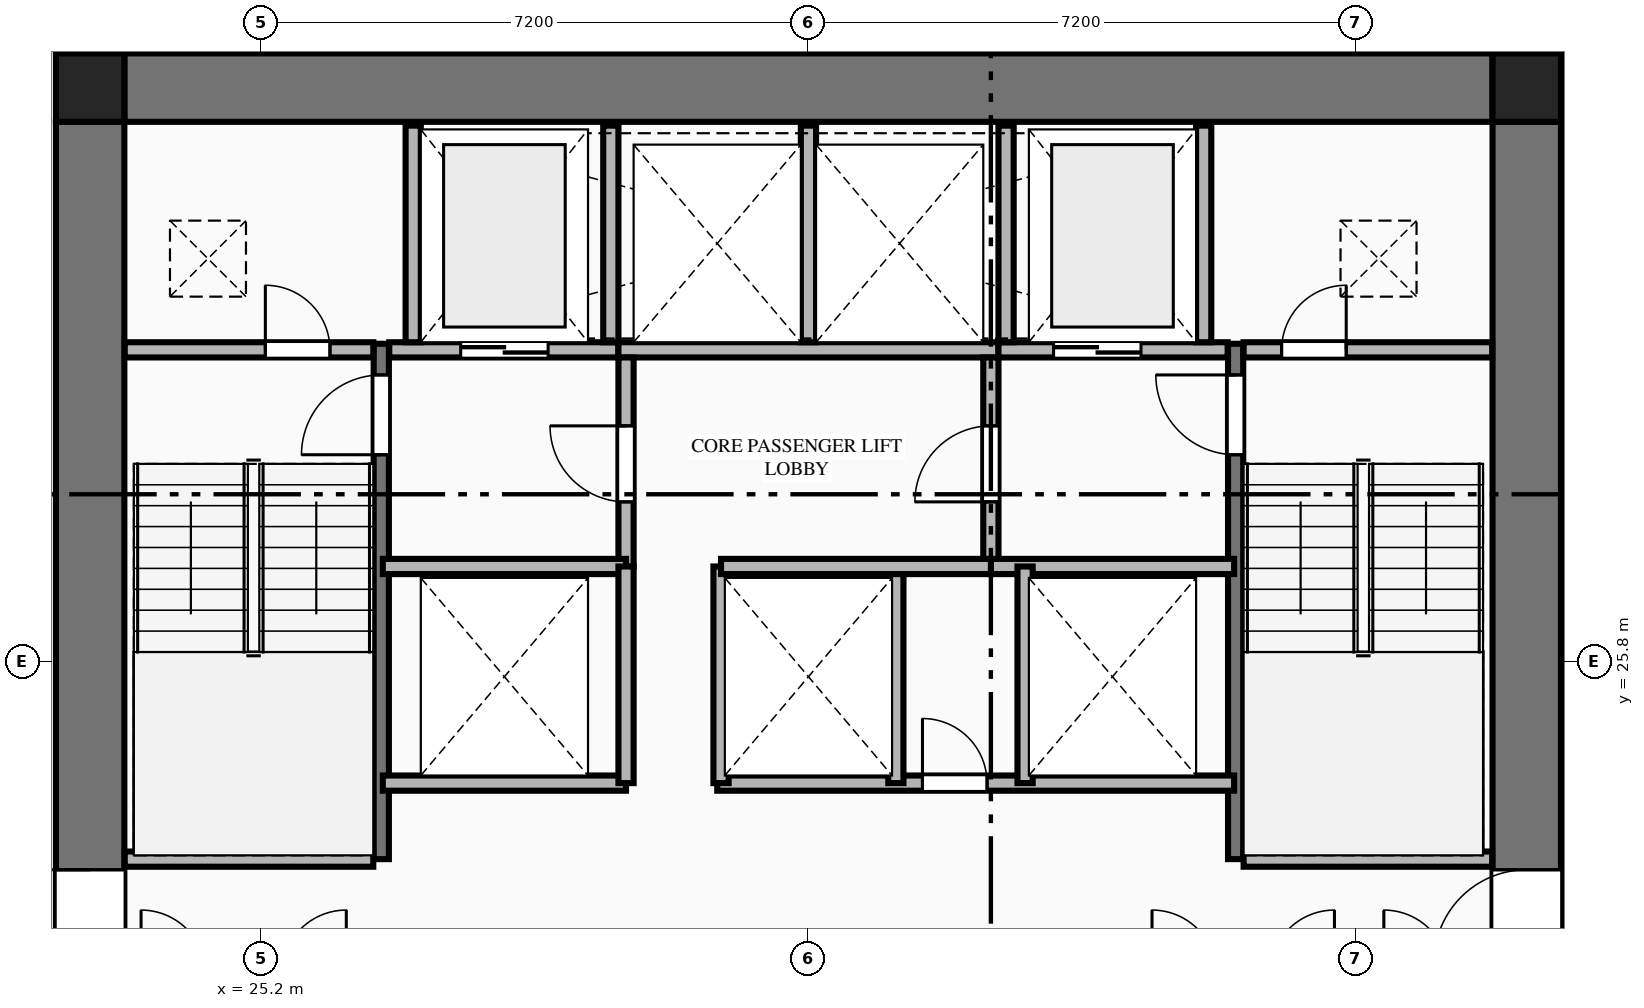
"""IFC4 building model, lengths in metres.
Left out: names, types, materials, properties, quantities, classifications, styles, units other than length and angle.
Written with IfcOpenShell. Run it as: python <this file> out.ifc"""

import sys

from ifc_helpers import new_model, si_unit, direction, frame, frame_2d, origin, origin_2d, place, context, subcontext, project, spatial, rectangle, extrude, element, fill, save


model = new_model("IFC4")
c1 = context("Model", 3, precision=1e-05, world=origin(), true_north=direction((0.0, 1.0)))
c2 = subcontext(c1, "Body", "Model", "MODEL_VIEW")
j1 = project(units=[si_unit("LENGTHUNIT", "METRE"), si_unit("PLANEANGLEUNIT", "RADIAN")], contexts=[c1])
p1 = place(None, origin())
s1 = spatial("IfcSite", under=j1, at=p1, CompositionType="ELEMENT")
p2 = place(p1, origin())
s2 = spatial("IfcBuilding", under=s1, at=p2, CompositionType="ELEMENT")
p3 = place(p2, frame((0.0, 0.0, 46.2)))
s3 = spatial("IfcBuildingStorey", under=s2, at=p3, CompositionType="ELEMENT", Elevation=46.2)
for number, where, z_axis, x_axis in (
    (1, (41.85, 33.35, 0.0), (0.0, 0.0, 1.0), (1.0, 0.0, 0.0)),
    (2, (22.95, 33.35, 0.0), (0.0, 0.0, 1.0), (1.0, 0.0, 0.0)),
):
    element("IfcColumn", number, at=place(p3, frame(where, z_axis=z_axis, x_axis=x_axis)), inside=s3, PredefinedType="COLUMN", context=c2, shape_type="SweptSolid", body=[
        extrude(rectangle(XDim=0.9, YDim=0.9, at=origin_2d()), origin(), (0.0, 0.0, 1.0), 3.55),
    ])
p4 = place(p3, frame((23.4, 33.35, 0.0), z_axis=(0.0, 0.0, 1.0), x_axis=(1.0, 0.0, 0.0)))
e3 = element("IfcWall", 3, at=p4, inside=s3, PredefinedType="SHEAR", context=c2, shape_type="SweptSolid", body=[
    extrude(rectangle(XDim=18.0, YDim=0.9, at=frame_2d((9.0, 0.0))), origin(), (0.0, 0.0, 1.0), 3.33),
])
p5 = place(p3, frame((22.95, 18.9, 0.0), z_axis=(0.0, 0.0, 1.0), x_axis=(0.0, 1.0, 0.0)))
e4 = element("IfcWall", 4, at=p5, inside=s3, PredefinedType="SHEAR", context=c2, shape_type="SweptSolid", body=[
    extrude(rectangle(XDim=14.0, YDim=0.9, at=frame_2d((7.0, 0.0))), origin(), (0.0, 0.0, 1.0), 3.33),
])
p6 = place(p5, frame((2.94, 0.0, 0.0)))
e5 = element("IfcOpeningElement", 5, at=p6, cuts=e4, PredefinedType="OPENING", context=c2, shape_type="SweptSolid", body=[
    extrude(rectangle(XDim=1.22, YDim=2.25, at=frame_2d((0.61, 1.125))), frame((0.0, 0.46, 0.0), z_axis=(0.0, -1.0, 0.0), x_axis=(1.0, 0.0, 0.0)), (0.0, 0.0, 1.0), 0.92),
])
p7 = place(p3, frame((41.85, 18.9, 0.0), z_axis=(0.0, 0.0, 1.0), x_axis=(0.0, 1.0, 0.0)))
e6 = element("IfcWall", 6, at=p7, inside=s3, PredefinedType="SHEAR", context=c2, shape_type="SweptSolid", body=[
    extrude(rectangle(XDim=14.0, YDim=0.9, at=frame_2d((7.0, 0.0))), origin(), (0.0, 0.0, 1.0), 3.33),
])
p8 = place(p7, frame((2.94, 0.0, 0.0)))
e7 = element("IfcOpeningElement", 7, at=p8, cuts=e6, PredefinedType="OPENING", context=c2, shape_type="SweptSolid", body=[
    extrude(rectangle(XDim=1.22, YDim=2.25, at=frame_2d((0.61, 1.125))), frame((0.0, 0.46, 0.0), z_axis=(0.0, -1.0, 0.0), x_axis=(1.0, 0.0, 0.0)), (0.0, 0.0, 1.0), 0.92),
])
p9 = place(p3, frame((26.78, 23.2, 0.0), z_axis=(0.0, 0.0, 1.0), x_axis=(0.0, 1.0, 0.0)))
e8 = element("IfcWall", 8, at=p9, inside=s3, PredefinedType="SHEAR", context=c2, shape_type="SweptSolid", body=[
    extrude(rectangle(XDim=6.78, YDim=0.2, at=frame_2d((3.39, 0.0))), origin(), (0.0, 0.0, 1.0), 3.55),
])
p10 = place(p9, frame((5.32, 0.0, 0.0)))
e9 = element("IfcOpeningElement", 9, at=p10, cuts=e8, PredefinedType="OPENING", context=c2, shape_type="SweptSolid", body=[
    extrude(rectangle(XDim=1.05, YDim=2.15, at=frame_2d((0.525, 1.075))), frame((0.0, 0.11, 0.0), z_axis=(0.0, -1.0, 0.0), x_axis=(1.0, 0.0, 0.0)), (0.0, 0.0, 1.0), 0.22),
])
p11 = place(p3, frame((23.405, 23.2, 0.0), z_axis=(0.0, 0.0, 1.0), x_axis=(1.0, 0.0, 0.0)))
e10 = element("IfcWall", 10, at=p11, inside=s3, PredefinedType="PLUMBINGWALL", context=c2, shape_type="SweptSolid", body=[
    extrude(rectangle(XDim=3.27, YDim=0.2, at=frame_2d((1.635, 0.0))), origin(), (0.0, 0.0, 1.0), 3.33),
])
p12 = place(p3, frame((38.02, 23.2, 0.0), z_axis=(0.0, 0.0, 1.0), x_axis=(0.0, 1.0, 0.0)))
e11 = element("IfcWall", 11, at=p12, inside=s3, PredefinedType="SHEAR", context=c2, shape_type="SweptSolid", body=[
    extrude(rectangle(XDim=6.78, YDim=0.2, at=frame_2d((3.39, 0.0))), origin(), (0.0, 0.0, 1.0), 3.55),
])
p13 = place(p12, frame((5.32, 0.0, 0.0)))
e12 = element("IfcOpeningElement", 12, at=p13, cuts=e11, PredefinedType="OPENING", context=c2, shape_type="SweptSolid", body=[
    extrude(rectangle(XDim=1.05, YDim=2.15, at=frame_2d((0.525, 1.075))), frame((0.0, 0.11, 0.0), z_axis=(0.0, -1.0, 0.0), x_axis=(1.0, 0.0, 0.0)), (0.0, 0.0, 1.0), 0.22),
])
p14 = place(p3, frame((38.125, 23.2, 0.0), z_axis=(0.0, 0.0, 1.0), x_axis=(1.0, 0.0, 0.0)))
e13 = element("IfcWall", 13, at=p14, inside=s3, PredefinedType="PLUMBINGWALL", context=c2, shape_type="SweptSolid", body=[
    extrude(rectangle(XDim=3.27, YDim=0.2, at=frame_2d((1.635, 0.0))), origin(), (0.0, 0.0, 1.0), 3.33),
])
p15 = place(p3, frame((23.405, 29.9, 0.0), z_axis=(0.0, 0.0, 1.0), x_axis=(1.0, 0.0, 0.0)))
e14 = element("IfcWall", 14, at=p15, inside=s3, PredefinedType="PLUMBINGWALL", context=c2, shape_type="SweptSolid", body=[
    extrude(rectangle(XDim=3.27, YDim=0.2, at=frame_2d((1.635, 0.0))), origin(), (0.0, 0.0, 1.0), 3.33),
])
p16 = place(p15, frame((1.85, 0.0, 0.0)))
e15 = element("IfcOpeningElement", 15, at=p16, cuts=e14, PredefinedType="OPENING", context=c2, shape_type="SweptSolid", body=[
    extrude(rectangle(XDim=0.85, YDim=2.05, at=frame_2d((0.425, 1.025))), frame((0.0, 0.11, 0.0), z_axis=(0.0, -1.0, 0.0), x_axis=(1.0, 0.0, 0.0)), (0.0, 0.0, 1.0), 0.22),
])
p17 = place(p3, frame((26.885, 29.9, 0.0), z_axis=(0.0, 0.0, 1.0), x_axis=(1.0, 0.0, 0.0)))
e16 = element("IfcWall", 16, at=p17, inside=s3, PredefinedType="PLUMBINGWALL", context=c2, shape_type="SweptSolid", body=[
    extrude(rectangle(XDim=3.015, YDim=0.2, at=frame_2d((1.507, 0.0))), origin(), (0.0, 0.0, 1.0), 3.33),
])
p18 = place(p17, frame((0.94, 0.0, 0.0)))
e17 = element("IfcOpeningElement", 17, at=p18, cuts=e16, PredefinedType="OPENING", context=c2, shape_type="SweptSolid", body=[
    extrude(rectangle(XDim=1.15, YDim=2.2, at=frame_2d((0.575, 1.1))), frame((0.0, 0.11, 0.0), z_axis=(0.0, -1.0, 0.0), x_axis=(1.0, 0.0, 0.0)), (0.0, 0.0, 1.0), 0.22),
])
p19 = place(p3, frame((29.9, 29.9, 0.0), z_axis=(0.0, 0.0, 1.0), x_axis=(1.0, 0.0, 0.0)))
e18 = element("IfcWall", 18, at=p19, inside=s3, PredefinedType="PLUMBINGWALL", context=c2, shape_type="SweptSolid", body=[
    extrude(rectangle(XDim=5.0, YDim=0.2, at=frame_2d((2.5, 0.0))), origin(), (0.0, 0.0, 1.0), 3.33),
])
p20 = place(p3, frame((34.9, 29.9, 0.0), z_axis=(0.0, 0.0, 1.0), x_axis=(1.0, 0.0, 0.0)))
e19 = element("IfcWall", 19, at=p20, inside=s3, PredefinedType="PLUMBINGWALL", context=c2, shape_type="SweptSolid", body=[
    extrude(rectangle(XDim=3.015, YDim=0.2, at=frame_2d((1.508, 0.0))), origin(), (0.0, 0.0, 1.0), 3.33),
])
p21 = place(p20, frame((0.725, 0.0, 0.0)))
e20 = element("IfcOpeningElement", 20, at=p21, cuts=e19, PredefinedType="OPENING", context=c2, shape_type="SweptSolid", body=[
    extrude(rectangle(XDim=1.15, YDim=2.2, at=frame_2d((0.575, 1.1))), frame((0.0, 0.11, 0.0), z_axis=(0.0, -1.0, 0.0), x_axis=(1.0, 0.0, 0.0)), (0.0, 0.0, 1.0), 0.22),
])
p22 = place(p3, frame((38.125, 29.9, 0.0), z_axis=(0.0, 0.0, 1.0), x_axis=(1.0, 0.0, 0.0)))
e21 = element("IfcWall", 21, at=p22, inside=s3, PredefinedType="PLUMBINGWALL", context=c2, shape_type="SweptSolid", body=[
    extrude(rectangle(XDim=3.27, YDim=0.2, at=frame_2d((1.635, 0.0))), origin(), (0.0, 0.0, 1.0), 3.33),
])
p23 = place(p22, frame((0.5, 0.0, 0.0)))
e22 = element("IfcOpeningElement", 22, at=p23, cuts=e21, PredefinedType="OPENING", context=c2, shape_type="SweptSolid", body=[
    extrude(rectangle(XDim=0.85, YDim=2.05, at=frame_2d((0.425, 1.025))), frame((0.0, 0.11, 0.0), z_axis=(0.0, -1.0, 0.0), x_axis=(1.0, 0.0, 0.0)), (0.0, 0.0, 1.0), 0.22),
])
for number, where, z_axis, x_axis in (
    (23, (27.2, 30.0, 0.0), (0.0, 0.0, 1.0), (0.0, 1.0, 0.0)),
    (24, (29.8, 30.0, 0.0), (0.0, 0.0, 1.0), (0.0, 1.0, 0.0)),
    (25, (32.4, 30.0, 0.0), (0.0, 0.0, 1.0), (0.0, 1.0, 0.0)),
    (26, (35.0, 30.0, 0.0), (0.0, 0.0, 1.0), (0.0, 1.0, 0.0)),
    (27, (37.6, 30.0, 0.0), (0.0, 0.0, 1.0), (0.0, 1.0, 0.0)),
):
    element("IfcWall", number, at=place(p3, frame(where, z_axis=z_axis, x_axis=x_axis)), inside=s3, PredefinedType="PLUMBINGWALL", context=c2, shape_type="SweptSolid", body=[
        extrude(rectangle(XDim=2.85, YDim=0.2, at=frame_2d((1.425, 0.0))), origin(), (0.0, 0.0, 1.0), 3.33),
    ])
p24 = place(p3, frame((30.0, 27.05, 0.0), z_axis=(0.0, 0.0, 1.0), x_axis=(0.0, 1.0, 0.0)))
e28 = element("IfcWall", 28, at=p24, inside=s3, PredefinedType="PLUMBINGWALL", context=c2, shape_type="SweptSolid", body=[
    extrude(rectangle(XDim=2.75, YDim=0.2, at=frame_2d((1.375, 0.0))), origin(), (0.0, 0.0, 1.0), 3.33),
])
p25 = place(p24, frame((0.85, 0.0, 0.0)))
e29 = element("IfcOpeningElement", 29, at=p25, cuts=e28, PredefinedType="OPENING", context=c2, shape_type="SweptSolid", body=[
    extrude(rectangle(XDim=1.0, YDim=2.15, at=frame_2d((0.5, 1.075))), frame((0.0, 0.11, 0.0), z_axis=(0.0, -1.0, 0.0), x_axis=(1.0, 0.0, 0.0)), (0.0, 0.0, 1.0), 0.22),
])
p26 = place(p3, frame((26.8, 27.05, 0.0), z_axis=(0.0, 0.0, 1.0), x_axis=(1.0, 0.0, 0.0)))
e30 = element("IfcWall", 30, at=p26, inside=s3, PredefinedType="PLUMBINGWALL", context=c2, shape_type="SweptSolid", body=[
    extrude(rectangle(XDim=3.2, YDim=0.2, at=frame_2d((1.6, 0.0))), origin(), (0.0, 0.0, 1.0), 3.33),
])
p27 = place(p3, frame((34.8, 27.05, 0.0), z_axis=(0.0, 0.0, 1.0), x_axis=(0.0, 1.0, 0.0)))
e31 = element("IfcWall", 31, at=p27, inside=s3, PredefinedType="PLUMBINGWALL", context=c2, shape_type="SweptSolid", body=[
    extrude(rectangle(XDim=2.75, YDim=0.2, at=frame_2d((1.375, 0.0))), origin(), (0.0, 0.0, 1.0), 3.33),
])
p28 = place(p27, frame((0.85, 0.0, 0.0)))
e32 = element("IfcOpeningElement", 32, at=p28, cuts=e31, PredefinedType="OPENING", context=c2, shape_type="SweptSolid", body=[
    extrude(rectangle(XDim=1.0, YDim=2.15, at=frame_2d((0.5, 1.075))), frame((0.0, 0.11, 0.0), z_axis=(0.0, -1.0, 0.0), x_axis=(1.0, 0.0, 0.0)), (0.0, 0.0, 1.0), 0.22),
])
for number, where, z_axis, x_axis in (
    (33, (34.8, 27.05, 0.0), (0.0, 0.0, 1.0), (1.0, 0.0, 0.0)),
    (34, (26.8, 24.2, 0.0), (0.0, 0.0, 1.0), (1.0, 0.0, 0.0)),
):
    element("IfcWall", number, at=place(p3, frame(where, z_axis=z_axis, x_axis=x_axis)), inside=s3, PredefinedType="PLUMBINGWALL", context=c2, shape_type="SweptSolid", body=[
        extrude(rectangle(XDim=3.2, YDim=0.2, at=frame_2d((1.6, 0.0))), origin(), (0.0, 0.0, 1.0), 3.33),
    ])
p29 = place(p3, frame((30.0, 24.2, 0.0), z_axis=(0.0, 0.0, 1.0), x_axis=(0.0, 1.0, 0.0)))
e35 = element("IfcWall", 35, at=p29, inside=s3, PredefinedType="PLUMBINGWALL", context=c2, shape_type="SweptSolid", body=[
    extrude(rectangle(XDim=2.85, YDim=0.2, at=frame_2d((1.425, 0.0))), origin(), (0.0, 0.0, 1.0), 3.33),
])
p30 = place(p3, frame((31.2, 24.2, 0.0), z_axis=(0.0, 0.0, 1.0), x_axis=(1.0, 0.0, 0.0)))
e36 = element("IfcWall", 36, at=p30, inside=s3, PredefinedType="PLUMBINGWALL", context=c2, shape_type="SweptSolid", body=[
    extrude(rectangle(XDim=6.8, YDim=0.2, at=frame_2d((3.4, 0.0))), origin(), (0.0, 0.0, 1.0), 3.33),
])
p31 = place(p30, frame((2.7, 0.0, 0.0)))
e37 = element("IfcOpeningElement", 37, at=p31, cuts=e36, PredefinedType="OPENING", context=c2, shape_type="SweptSolid", body=[
    extrude(rectangle(XDim=0.85, YDim=2.05, at=frame_2d((0.425, 1.025))), frame((0.0, 0.11, 0.0), z_axis=(0.0, -1.0, 0.0), x_axis=(1.0, 0.0, 0.0)), (0.0, 0.0, 1.0), 0.22),
])
for number, where, z_axis, x_axis in (
    (38, (31.25, 24.2, 0.0), (0.0, 0.0, 1.0), (0.0, 1.0, 0.0)),
    (39, (33.55, 24.2, 0.0), (0.0, 0.0, 1.0), (0.0, 1.0, 0.0)),
    (40, (35.25, 24.2, 0.0), (0.0, 0.0, 1.0), (0.0, 1.0, 0.0)),
):
    element("IfcWall", number, at=place(p3, frame(where, z_axis=z_axis, x_axis=x_axis)), inside=s3, PredefinedType="PLUMBINGWALL", context=c2, shape_type="SweptSolid", body=[
        extrude(rectangle(XDim=2.85, YDim=0.2, at=frame_2d((1.425, 0.0))), origin(), (0.0, 0.0, 1.0), 3.33),
    ])
p32 = place(p3, frame((31.25, 27.05, 0.0), z_axis=(0.0, 0.0, 1.0), x_axis=(1.0, 0.0, 0.0)))
e41 = element("IfcWall", 41, at=p32, inside=s3, PredefinedType="PLUMBINGWALL", context=c2, shape_type="SweptSolid", body=[
    extrude(rectangle(XDim=3.55, YDim=0.2, at=frame_2d((1.775, 0.0))), origin(), (0.0, 0.0, 1.0), 3.33),
])
p33 = place(p6, origin())
e42 = element("IfcDoor", 42, at=p33, inside=s3, OperationType="SINGLE_SWING_RIGHT", PredefinedType="DOOR", context=c2, shape_type="SweptSolid", body=[
    extrude(rectangle(XDim=1.22, YDim=2.25, at=frame_2d((0.61, 1.125))), frame((0.0, 0.025, 0.0), z_axis=(0.0, -1.0, 0.0), x_axis=(1.0, 0.0, 0.0)), (0.0, 0.0, 1.0), 0.05),
])
fill(e5, e42)
p34 = place(p8, origin())
e43 = element("IfcDoor", 43, at=p34, inside=s3, OperationType="SINGLE_SWING_LEFT", PredefinedType="DOOR", context=c2, shape_type="SweptSolid", body=[
    extrude(rectangle(XDim=1.22, YDim=2.25, at=frame_2d((0.61, 1.125))), frame((0.0, 0.025, 0.0), z_axis=(0.0, -1.0, 0.0), x_axis=(1.0, 0.0, 0.0)), (0.0, 0.0, 1.0), 0.05),
])
fill(e7, e43)
p35 = place(p10, origin())
e44 = element("IfcDoor", 44, at=p35, inside=s3, OperationType="SINGLE_SWING_LEFT", PredefinedType="DOOR", context=c2, shape_type="SweptSolid", body=[
    extrude(rectangle(XDim=1.05, YDim=2.15, at=frame_2d((0.525, 1.075))), frame((0.0, 0.025, 0.0), z_axis=(0.0, -1.0, 0.0), x_axis=(1.0, 0.0, 0.0)), (0.0, 0.0, 1.0), 0.05),
])
fill(e9, e44)
p36 = place(p13, origin())
e45 = element("IfcDoor", 45, at=p36, inside=s3, OperationType="SINGLE_SWING_RIGHT", PredefinedType="DOOR", context=c2, shape_type="SweptSolid", body=[
    extrude(rectangle(XDim=1.05, YDim=2.15, at=frame_2d((0.525, 1.075))), frame((0.0, 0.025, 0.0), z_axis=(0.0, -1.0, 0.0), x_axis=(1.0, 0.0, 0.0)), (0.0, 0.0, 1.0), 0.05),
])
fill(e12, e45)
p37 = place(p16, origin())
e46 = element("IfcDoor", 46, at=p37, inside=s3, OperationType="SINGLE_SWING_LEFT", PredefinedType="DOOR", context=c2, shape_type="SweptSolid", body=[
    extrude(rectangle(XDim=0.85, YDim=2.05, at=frame_2d((0.425, 1.025))), frame((0.0, 0.025, 0.0), z_axis=(0.0, -1.0, 0.0), x_axis=(1.0, 0.0, 0.0)), (0.0, 0.0, 1.0), 0.05),
])
fill(e15, e46)
p38 = place(p23, origin())
e47 = element("IfcDoor", 47, at=p38, inside=s3, OperationType="SINGLE_SWING_RIGHT", PredefinedType="DOOR", context=c2, shape_type="SweptSolid", body=[
    extrude(rectangle(XDim=0.85, YDim=2.05, at=frame_2d((0.425, 1.025))), frame((0.0, 0.025, 0.0), z_axis=(0.0, -1.0, 0.0), x_axis=(1.0, 0.0, 0.0)), (0.0, 0.0, 1.0), 0.05),
])
fill(e22, e47)
p39 = place(p18, origin())
e48 = element("IfcDoor", 48, at=p39, inside=s3, OperationType="DOUBLE_DOOR_SLIDING", PredefinedType="DOOR", context=c2, shape_type="SweptSolid", body=[
    extrude(rectangle(XDim=1.15, YDim=2.2, at=frame_2d((0.575, 1.1))), frame((0.0, 0.025, 0.0), z_axis=(0.0, -1.0, 0.0), x_axis=(1.0, 0.0, 0.0)), (0.0, 0.0, 1.0), 0.05),
])
fill(e17, e48)
p40 = place(p21, origin())
e49 = element("IfcDoor", 49, at=p40, inside=s3, OperationType="DOUBLE_DOOR_SLIDING", PredefinedType="DOOR", context=c2, shape_type="SweptSolid", body=[
    extrude(rectangle(XDim=1.15, YDim=2.2, at=frame_2d((0.575, 1.1))), frame((0.0, 0.025, 0.0), z_axis=(0.0, -1.0, 0.0), x_axis=(1.0, 0.0, 0.0)), (0.0, 0.0, 1.0), 0.05),
])
fill(e20, e49)
p41 = place(p25, origin())
e50 = element("IfcDoor", 50, at=p41, inside=s3, OperationType="SINGLE_SWING_RIGHT", PredefinedType="DOOR", context=c2, shape_type="SweptSolid", body=[
    extrude(rectangle(XDim=1.0, YDim=2.15, at=frame_2d((0.5, 1.075))), frame((0.0, 0.025, 0.0), z_axis=(0.0, -1.0, 0.0), x_axis=(1.0, 0.0, 0.0)), (0.0, 0.0, 1.0), 0.05),
])
fill(e29, e50)
p42 = place(p28, origin())
e51 = element("IfcDoor", 51, at=p42, inside=s3, OperationType="SINGLE_SWING_LEFT", PredefinedType="DOOR", context=c2, shape_type="SweptSolid", body=[
    extrude(rectangle(XDim=1.0, YDim=2.15, at=frame_2d((0.5, 1.075))), frame((0.0, 0.025, 0.0), z_axis=(0.0, -1.0, 0.0), x_axis=(1.0, 0.0, 0.0)), (0.0, 0.0, 1.0), 0.05),
])
fill(e32, e51)
p43 = place(p31, origin())
e52 = element("IfcDoor", 52, at=p43, inside=s3, OperationType="SINGLE_SWING_LEFT", PredefinedType="DOOR", context=c2, shape_type="SweptSolid", body=[
    extrude(rectangle(XDim=0.85, YDim=2.05, at=frame_2d((0.425, 1.025))), frame((0.0, 0.025, 0.0), z_axis=(0.0, -1.0, 0.0), x_axis=(1.0, 0.0, 0.0)), (0.0, 0.0, 1.0), 0.05),
])
fill(e37, e52)
save(model, sys.argv[1])
